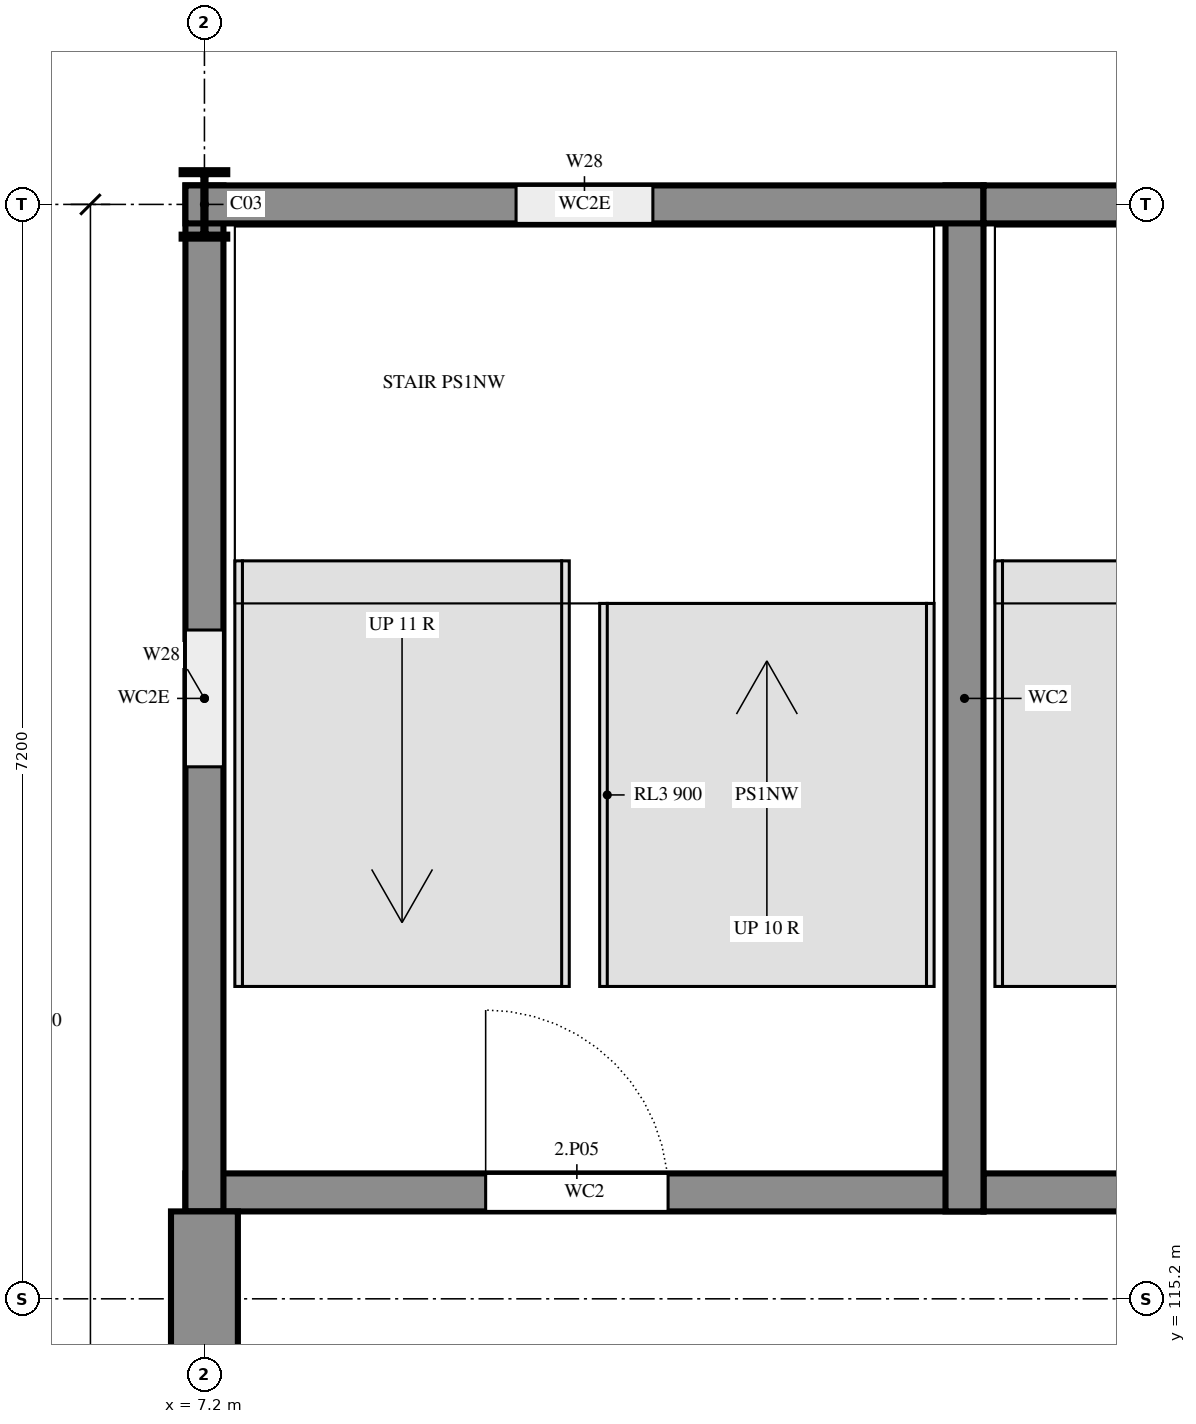
"""IFC4 building model, lengths in metres.
Left out: names, types, materials, properties, quantities, classifications, styles, units other than length and angle.
Written with IfcOpenShell. Run it as: python <this file> out.ifc"""

import sys

from ifc_helpers import new_model, si_unit, direction, frame, frame_2d, origin, origin_2d, place, context, subcontext, project, spatial, rectangle, i_section, extrude, element, fill, save


model = new_model("IFC4")
c1 = context("Model", 3, precision=1e-05, world=origin(), true_north=direction((0.0, 1.0)))
c2 = subcontext(c1, "Body", "Model", "MODEL_VIEW")
j1 = project(units=[si_unit("LENGTHUNIT", "METRE"), si_unit("PLANEANGLEUNIT", "RADIAN")], contexts=[c1])
p1 = place(None, origin())
s1 = spatial("IfcSite", under=j1, at=p1, CompositionType="ELEMENT")
p2 = place(p1, origin())
s2 = spatial("IfcBuilding", under=s1, at=p2, CompositionType="ELEMENT")
p3 = place(p2, frame((0.0, 0.0, 7.2)))
s3 = spatial("IfcBuildingStorey", under=s2, at=p3, CompositionType="ELEMENT", Elevation=7.2)
p4 = place(p3, frame((7.2, 122.4, 0.0), z_axis=(0.0, 0.0, 1.0), x_axis=(1.0, 0.0, 0.0)))
e1 = element("IfcColumn", 1, at=p4, inside=s3, PredefinedType="COLUMN", context=c2, shape_type="SweptSolid", body=[
    extrude(i_section(OverallWidth=0.3, OverallDepth=0.45, WebThickness=0.014, FlangeThickness=0.026, FilletRadius=0.027, at=origin_2d()), origin(), (0.0, 0.0, 1.0), 3.6),
])
p5 = place(p3, frame((7.075, 115.9, 0.0), z_axis=(0.0, 0.0, 1.0), x_axis=(1.0, 0.0, 0.0)))
e2 = element("IfcWall", 2, at=p5, inside=s3, PredefinedType="SHEAR", context=c2, shape_type="SweptSolid", body=[
    extrude(rectangle(XDim=5.25, YDim=0.25, at=frame_2d((2.625, 0.0))), origin(), (0.0, 0.0, 1.0), 3.6),
])
p6 = place(p5, frame((1.975, 0.0, 0.0)))
e3 = element("IfcOpeningElement", 3, at=p6, cuts=e2, PredefinedType="OPENING", context=c2, shape_type="SweptSolid", body=[
    extrude(rectangle(XDim=1.2, YDim=2.4, at=frame_2d((0.6, 1.2))), frame((0.0, 0.135, 0.0), z_axis=(0.0, -1.0, 0.0), x_axis=(1.0, 0.0, 0.0)), (0.0, 0.0, 1.0), 0.27),
])
p7 = place(p3, frame((12.325, 115.9, 0.0), z_axis=(0.0, 0.0, 1.0), x_axis=(1.0, 0.0, 0.0)))
e4 = element("IfcWall", 4, at=p7, inside=s3, PredefinedType="SHEAR", context=c2, shape_type="SweptSolid", body=[
    extrude(rectangle(XDim=5.0, YDim=0.25, at=frame_2d((2.5, 0.0))), origin(), (0.0, 0.0, 1.0), 3.6),
])
p8 = place(p3, frame((12.2, 115.775, 0.0), z_axis=(0.0, 0.0, 1.0), x_axis=(0.0, 1.0, 0.0)))
e5 = element("IfcWall", 5, at=p8, inside=s3, PredefinedType="SHEAR", context=c2, shape_type="SweptSolid", body=[
    extrude(rectangle(XDim=6.75, YDim=0.25, at=frame_2d((3.375, 0.0))), origin(), (0.0, 0.0, 1.0), 3.6),
])
p9 = place(p3, frame((7.2, 122.525, 0.0), z_axis=(0.0, 0.0, 1.0), x_axis=(0.0, -1.0, 0.0)))
e6 = element("IfcWall", 6, at=p9, inside=s3, PredefinedType="SHEAR", context=c2, shape_type="SweptSolid", body=[
    extrude(rectangle(XDim=6.75, YDim=0.25, at=frame_2d((3.375, 0.0))), origin(), (0.0, 0.0, 1.0), 3.6),
])
p10 = place(p9, frame((2.925, 0.0, 0.6)))
e7 = element("IfcOpeningElement", 7, at=p10, cuts=e6, PredefinedType="OPENING", context=c2, shape_type="SweptSolid", body=[
    extrude(rectangle(XDim=0.9, YDim=2.1, at=frame_2d((0.45, 1.05))), frame((0.0, 0.135, 0.0), z_axis=(0.0, -1.0, 0.0), x_axis=(1.0, 0.0, 0.0)), (0.0, 0.0, 1.0), 0.27),
])
p11 = place(p3, frame((12.325, 122.4, 0.0), z_axis=(0.0, 0.0, 1.0), x_axis=(-1.0, 0.0, 0.0)))
e8 = element("IfcWall", 8, at=p11, inside=s3, PredefinedType="SHEAR", context=c2, shape_type="SweptSolid", body=[
    extrude(rectangle(XDim=5.25, YDim=0.25, at=frame_2d((2.625, 0.0))), origin(), (0.0, 0.0, 1.0), 3.6),
])
p12 = place(p11, frame((2.175, 0.0, 0.6)))
e9 = element("IfcOpeningElement", 9, at=p12, cuts=e8, PredefinedType="OPENING", context=c2, shape_type="SweptSolid", body=[
    extrude(rectangle(XDim=0.9, YDim=2.1, at=frame_2d((0.45, 1.05))), frame((0.0, 0.135, 0.0), z_axis=(0.0, -1.0, 0.0), x_axis=(1.0, 0.0, 0.0)), (0.0, 0.0, 1.0), 0.27),
])
p13 = place(p3, frame((17.325, 122.4, 0.0), z_axis=(0.0, 0.0, 1.0), x_axis=(-1.0, 0.0, 0.0)))
e10 = element("IfcWall", 10, at=p13, inside=s3, PredefinedType="SHEAR", context=c2, shape_type="SweptSolid", body=[
    extrude(rectangle(XDim=5.0, YDim=0.25, at=frame_2d((2.5, 0.0))), origin(), (0.0, 0.0, 1.0), 3.6),
])
p14 = place(p13, frame((2.175, 0.0, 0.6)))
e11 = element("IfcOpeningElement", 11, at=p14, cuts=e10, PredefinedType="OPENING", context=c2, shape_type="SweptSolid", body=[
    extrude(rectangle(XDim=0.9, YDim=2.1, at=frame_2d((0.45, 1.05))), frame((0.0, 0.135, 0.0), z_axis=(0.0, -1.0, 0.0), x_axis=(1.0, 0.0, 0.0)), (0.0, 0.0, 1.0), 0.27),
])
p15 = place(p3, frame((7.2, 115.775, 0.0), z_axis=(0.0, 0.0, 1.0), x_axis=(0.0, -1.0, 0.0)))
e12 = element("IfcWall", 12, at=p15, inside=s3, PredefinedType="SOLIDWALL", context=c2, shape_type="SweptSolid", body=[
    extrude(rectangle(XDim=4.175, YDim=0.44, at=frame_2d((2.087, 0.0))), origin(), (0.0, 0.0, 1.0), 3.42),
])
p16 = place(p15, frame((1.175, 0.0, 0.015)))
e13 = element("IfcOpeningElement", 13, at=p16, cuts=e12, PredefinedType="OPENING", context=c2, shape_type="SweptSolid", body=[
    extrude(rectangle(XDim=1.8, YDim=2.1, at=frame_2d((0.9, 1.05))), frame((0.0, 0.23, 0.0), z_axis=(0.0, -1.0, 0.0), x_axis=(1.0, 0.0, 0.0)), (0.0, 0.0, 1.0), 0.46),
])
p17 = place(p12, origin())
e14 = element("IfcWindow", 14, at=p17, inside=s3, PartitioningType="SINGLE_PANEL", PredefinedType="WINDOW", context=c2, shape_type="SweptSolid", body=[
    extrude(rectangle(XDim=0.9, YDim=2.1, at=frame_2d((0.45, 1.05))), frame((0.0, 0.03, 0.0), z_axis=(0.0, -1.0, 0.0), x_axis=(1.0, 0.0, 0.0)), (0.0, 0.0, 1.0), 0.06),
])
fill(e9, e14)
p18 = place(p10, origin())
e15 = element("IfcWindow", 15, at=p18, inside=s3, PartitioningType="SINGLE_PANEL", PredefinedType="WINDOW", context=c2, shape_type="SweptSolid", body=[
    extrude(rectangle(XDim=0.9, YDim=2.1, at=frame_2d((0.45, 1.05))), frame((0.0, 0.03, 0.0), z_axis=(0.0, -1.0, 0.0), x_axis=(1.0, 0.0, 0.0)), (0.0, 0.0, 1.0), 0.06),
])
fill(e7, e15)
p19 = place(p6, origin())
e16 = element("IfcDoor", 16, at=p19, inside=s3, OperationType="SINGLE_SWING_RIGHT", PredefinedType="DOOR", context=c2, shape_type="SweptSolid", body=[
    extrude(rectangle(XDim=1.2, YDim=2.4, at=frame_2d((0.6, 1.2))), frame((0.0, 0.025, 0.0), z_axis=(0.0, -1.0, 0.0), x_axis=(1.0, 0.0, 0.0)), (0.0, 0.0, 1.0), 0.05),
])
fill(e3, e16)
save(model, sys.argv[1])
